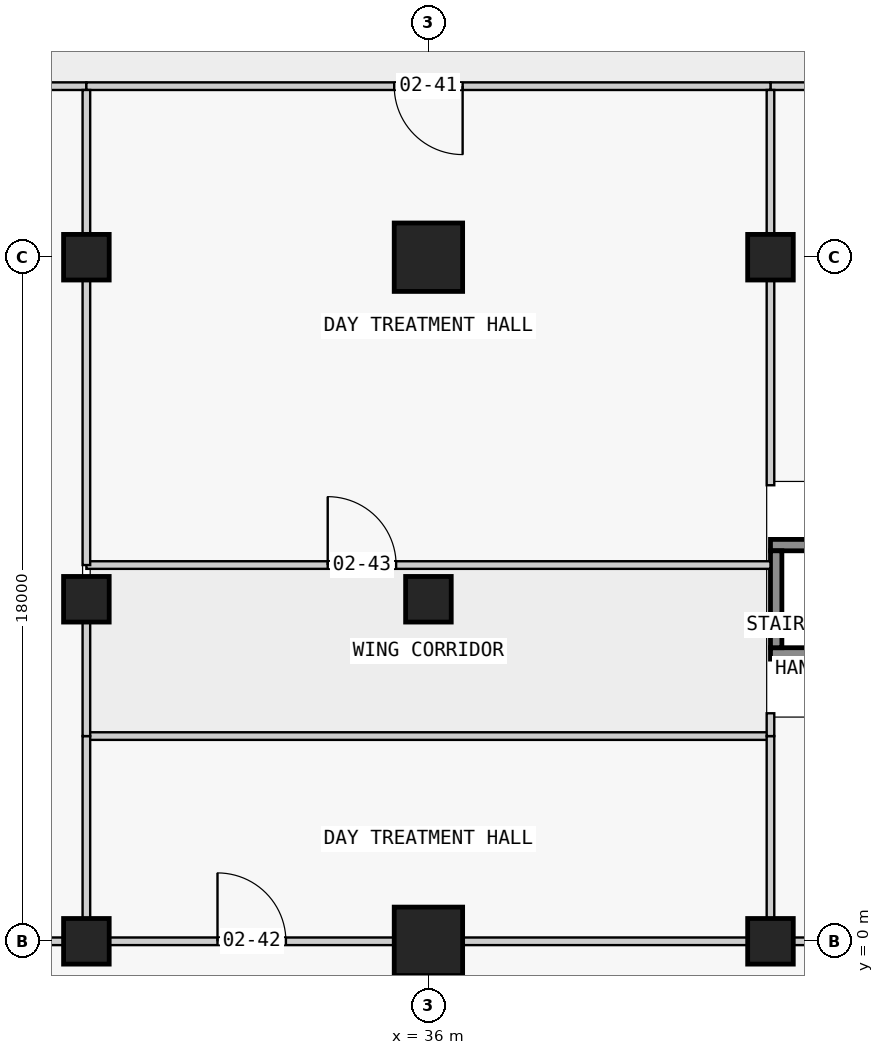
"""IFC4 building model, lengths in metres.
Left out: names, types, materials, properties, quantities, classifications, styles, units other than length and angle.
Written with IfcOpenShell. Run it as: python <this file> out.ifc"""

import sys

from ifc_helpers import new_model, si_unit, direction, frame, frame_2d, origin, origin_2d, place, context, subcontext, project, spatial, rectangle, extrude, element, fill, save


model = new_model("IFC4")
c1 = context("Model", 3, precision=1e-05, world=origin(), true_north=direction((0.0, 1.0)))
c2 = subcontext(c1, "Body", "Model", "MODEL_VIEW")
j1 = project(units=[si_unit("LENGTHUNIT", "METRE"), si_unit("PLANEANGLEUNIT", "RADIAN")], contexts=[c1])
p1 = place(None, origin())
s1 = spatial("IfcSite", under=j1, at=p1, CompositionType="ELEMENT")
p2 = place(p1, origin())
s2 = spatial("IfcBuilding", under=s1, at=p2, CompositionType="ELEMENT")
p3 = place(p2, frame((0.0, 0.0, 12.8)))
s3 = spatial("IfcBuildingStorey", under=s2, at=p3, CompositionType="ELEMENT", Elevation=12.8)
for number, where, z_axis, x_axis in (
    (1, (27.0, 0.0, 0.0), (0.0, 0.0, 1.0), (1.0, 0.0, 0.0)),
    (2, (27.0, 9.0, 0.0), (0.0, 0.0, 1.0), (1.0, 0.0, 0.0)),
    (3, (27.0, 18.0, 0.0), (0.0, 0.0, 1.0), (1.0, 0.0, 0.0)),
):
    element("IfcColumn", number, at=place(p3, frame(where, z_axis=z_axis, x_axis=x_axis)), inside=s3, PredefinedType="COLUMN", context=c2, shape_type="SweptSolid", body=[
        extrude(rectangle(XDim=1.2, YDim=1.2, at=origin_2d()), origin(), (0.0, 0.0, 1.0), 4.5),
    ])
p4 = place(p3, frame((36.0, 0.0, 0.0), z_axis=(0.0, 0.0, 1.0), x_axis=(1.0, 0.0, 0.0)))
e4 = element("IfcColumn", 4, at=p4, inside=s3, PredefinedType="COLUMN", context=c2, shape_type="SweptSolid", body=[
    extrude(rectangle(XDim=1.8, YDim=1.8, at=origin_2d()), origin(), (0.0, 0.0, 1.0), 4.5),
])
p5 = place(p3, frame((36.0, 9.0, 0.0), z_axis=(0.0, 0.0, 1.0), x_axis=(1.0, 0.0, 0.0)))
e5 = element("IfcColumn", 5, at=p5, inside=s3, PredefinedType="COLUMN", context=c2, shape_type="SweptSolid", body=[
    extrude(rectangle(XDim=1.2, YDim=1.2, at=origin_2d()), origin(), (0.0, 0.0, 1.0), 4.5),
])
p6 = place(p3, frame((36.0, 18.0, 0.0), z_axis=(0.0, 0.0, 1.0), x_axis=(1.0, 0.0, 0.0)))
e6 = element("IfcColumn", 6, at=p6, inside=s3, PredefinedType="COLUMN", context=c2, shape_type="SweptSolid", body=[
    extrude(rectangle(XDim=1.8, YDim=1.8, at=origin_2d()), origin(), (0.0, 0.0, 1.0), 4.5),
])
for number, where, z_axis, x_axis in (
    (7, (45.0, 0.0, 0.0), (0.0, 0.0, 1.0), (1.0, 0.0, 0.0)),
    (8, (45.0, 18.0, 0.0), (0.0, 0.0, 1.0), (1.0, 0.0, 0.0)),
):
    element("IfcColumn", number, at=place(p3, frame(where, z_axis=z_axis, x_axis=x_axis)), inside=s3, PredefinedType="COLUMN", context=c2, shape_type="SweptSolid", body=[
        extrude(rectangle(XDim=1.2, YDim=1.2, at=origin_2d()), origin(), (0.0, 0.0, 1.0), 4.5),
    ])
p7 = place(p3, frame((45.15, 7.725, 0.0), z_axis=(0.0, 0.0, 1.0), x_axis=(0.0, 1.0, 0.0)))
e9 = element("IfcWall", 9, at=p7, inside=s3, PredefinedType="SHEAR", context=c2, shape_type="SweptSolid", body=[
    extrude(rectangle(XDim=2.55, YDim=0.3, at=frame_2d((1.275, 0.0))), origin(), (0.0, 0.0, 1.0), 4.5),
])
for number, where, z_axis, x_axis in (
    (10, (45.0, 7.575, 0.0), (0.0, 0.0, 1.0), (1.0, 0.0, 0.0)),
    (11, (45.0, 10.425, 0.0), (0.0, 0.0, 1.0), (1.0, 0.0, 0.0)),
):
    element("IfcWall", number, at=place(p3, frame(where, z_axis=z_axis, x_axis=x_axis)), inside=s3, PredefinedType="SHEAR", context=c2, shape_type="SweptSolid", body=[
        extrude(rectangle(XDim=7.2, YDim=0.3, at=frame_2d((3.6, 0.0))), origin(), (0.0, 0.0, 1.0), 4.5),
    ])
p8 = place(p3, frame((45.6, 0.0, 0.0), z_axis=(0.0, 0.0, 1.0), x_axis=(1.0, 0.0, 0.0)))
e12 = element("IfcWall", 12, at=p8, inside=s3, PredefinedType="PARTITIONING", context=c2, shape_type="SweptSolid", body=[
    extrude(rectangle(XDim=7.5, YDim=0.2, at=frame_2d((3.75, 0.0))), origin(), (0.0, 0.0, 1.0), 3.45),
])
p9 = place(p8, frame((2.85, 0.0, 0.0)))
e13 = element("IfcOpeningElement", 13, at=p9, cuts=e12, PredefinedType="OPENING", context=c2, shape_type="SweptSolid", body=[
    extrude(rectangle(XDim=1.8, YDim=2.1, at=frame_2d((0.9, 1.05))), frame((0.0, 0.11, 0.0), z_axis=(0.0, -1.0, 0.0), x_axis=(1.0, 0.0, 0.0)), (0.0, 0.0, 1.0), 0.22),
])
p10 = place(p3, frame((72.0, 22.5, 0.0), z_axis=(0.0, 0.0, 1.0), x_axis=(-1.0, 0.0, 0.0)))
e14 = element("IfcWall", 14, at=p10, inside=s3, PredefinedType="PARTITIONING", context=c2, shape_type="SweptSolid", body=[
    extrude(rectangle(XDim=27.0, YDim=0.2, at=frame_2d((13.5, 0.0))), origin(), (0.0, 0.0, 1.0), 3.45),
])
p11 = place(p10, frame((12.6, 0.0, 0.0)))
e15 = element("IfcOpeningElement", 15, at=p11, cuts=e14, PredefinedType="OPENING", context=c2, shape_type="SweptSolid", body=[
    extrude(rectangle(XDim=1.8, YDim=2.1, at=frame_2d((0.9, 1.05))), frame((0.0, 0.11, 0.0), z_axis=(0.0, -1.0, 0.0), x_axis=(1.0, 0.0, 0.0)), (0.0, 0.0, 1.0), 0.22),
])
p12 = place(p3, frame((22.5, 22.5, 0.0), z_axis=(0.0, 0.0, 1.0), x_axis=(1.0, 0.0, 0.0)))
e16 = element("IfcWall", 16, at=p12, inside=s3, PredefinedType="PARTITIONING", context=c2, shape_type="SweptSolid", body=[
    extrude(rectangle(XDim=4.5, YDim=0.2, at=frame_2d((2.25, 0.0))), origin(), (0.0, 0.0, 1.0), 3.45),
])
p13 = place(p3, frame((45.0, 22.5, 0.0), z_axis=(0.0, 0.0, 1.0), x_axis=(-1.0, 0.0, 0.0)))
e17 = element("IfcWall", 17, at=p13, inside=s3, PredefinedType="PARTITIONING", context=c2, shape_type="SweptSolid", body=[
    extrude(rectangle(XDim=18.0, YDim=0.2, at=frame_2d((9.0, 0.0))), origin(), (0.0, 0.0, 1.0), 3.45),
])
p14 = place(p13, frame((8.1, 0.0, 0.0)))
e18 = element("IfcOpeningElement", 18, at=p14, cuts=e17, PredefinedType="OPENING", context=c2, shape_type="SweptSolid", body=[
    extrude(rectangle(XDim=1.8, YDim=2.1, at=frame_2d((0.9, 1.05))), frame((0.0, 0.11, 0.0), z_axis=(0.0, -1.0, 0.0), x_axis=(1.0, 0.0, 0.0)), (0.0, 0.0, 1.0), 0.22),
])
p15 = place(p3, frame((27.6, 0.0, 0.0), z_axis=(0.0, 0.0, 1.0), x_axis=(1.0, 0.0, 0.0)))
e19 = element("IfcWall", 19, at=p15, inside=s3, PredefinedType="PARTITIONING", context=c2, shape_type="SweptSolid", body=[
    extrude(rectangle(XDim=7.5, YDim=0.2, at=frame_2d((3.75, 0.0))), origin(), (0.0, 0.0, 1.0), 3.45),
])
p16 = place(p15, frame((2.85, 0.0, 0.0)))
e20 = element("IfcOpeningElement", 20, at=p16, cuts=e19, PredefinedType="OPENING", context=c2, shape_type="SweptSolid", body=[
    extrude(rectangle(XDim=1.8, YDim=2.1, at=frame_2d((0.9, 1.05))), frame((0.0, 0.11, 0.0), z_axis=(0.0, -1.0, 0.0), x_axis=(1.0, 0.0, 0.0)), (0.0, 0.0, 1.0), 0.22),
])
p17 = place(p3, frame((36.9, 0.0, 0.0), z_axis=(0.0, 0.0, 1.0), x_axis=(1.0, 0.0, 0.0)))
e21 = element("IfcWall", 21, at=p17, inside=s3, PredefinedType="PARTITIONING", context=c2, shape_type="SweptSolid", body=[
    extrude(rectangle(XDim=7.5, YDim=0.2, at=frame_2d((3.75, 0.0))), origin(), (0.0, 0.0, 1.0), 3.45),
])
p18 = place(p3, frame((27.0, 9.9, 0.0), z_axis=(0.0, 0.0, 1.0), x_axis=(1.0, 0.0, 0.0)))
e22 = element("IfcWall", 22, at=p18, inside=s3, PredefinedType="PARTITIONING", context=c2, shape_type="SweptSolid", body=[
    extrude(rectangle(XDim=18.0, YDim=0.2, at=frame_2d((9.0, 0.0))), origin(), (0.0, 0.0, 1.0), 3.45),
])
p19 = place(p18, frame((6.35, 0.0, 0.0)))
e23 = element("IfcOpeningElement", 23, at=p19, cuts=e22, PredefinedType="OPENING", context=c2, shape_type="SweptSolid", body=[
    extrude(rectangle(XDim=1.8, YDim=2.1, at=frame_2d((0.9, 1.05))), frame((0.0, 0.11, 0.0), z_axis=(0.0, -1.0, 0.0), x_axis=(1.0, 0.0, 0.0)), (0.0, 0.0, 1.0), 0.22),
])
p20 = place(p3, frame((45.0, 5.4, 0.0), z_axis=(0.0, 0.0, 1.0), x_axis=(-1.0, 0.0, 0.0)))
e24 = element("IfcWall", 24, at=p20, inside=s3, PredefinedType="PARTITIONING", context=c2, shape_type="SweptSolid", body=[
    extrude(rectangle(XDim=18.0, YDim=0.2, at=frame_2d((9.0, 0.0))), origin(), (0.0, 0.0, 1.0), 3.45),
])
p21 = place(p3, frame((27.0, 22.4, 0.0), z_axis=(0.0, 0.0, 1.0), x_axis=(0.0, -1.0, 0.0)))
e25 = element("IfcWall", 25, at=p21, inside=s3, PredefinedType="PARTITIONING", context=c2, shape_type="SweptSolid", body=[
    extrude(rectangle(XDim=3.8, YDim=0.2, at=frame_2d((1.9, 0.0))), origin(), (0.0, 0.0, 1.0), 3.45),
])
p22 = place(p3, frame((27.0, 17.4, 0.0), z_axis=(0.0, 0.0, 1.0), x_axis=(0.0, -1.0, 0.0)))
e26 = element("IfcWall", 26, at=p22, inside=s3, PredefinedType="PARTITIONING", context=c2, shape_type="SweptSolid", body=[
    extrude(rectangle(XDim=7.5, YDim=0.2, at=frame_2d((3.75, 0.0))), origin(), (0.0, 0.0, 1.0), 3.45),
])
p23 = place(p3, frame((45.0, 22.4, 0.0), z_axis=(0.0, 0.0, 1.0), x_axis=(0.0, -1.0, 0.0)))
e27 = element("IfcWall", 27, at=p23, inside=s3, PredefinedType="PARTITIONING", context=c2, shape_type="SweptSolid", body=[
    extrude(rectangle(XDim=3.8, YDim=0.2, at=frame_2d((1.9, 0.0))), origin(), (0.0, 0.0, 1.0), 3.45),
])
p24 = place(p3, frame((45.0, 17.4, 0.0), z_axis=(0.0, 0.0, 1.0), x_axis=(0.0, -1.0, 0.0)))
e28 = element("IfcWall", 28, at=p24, inside=s3, PredefinedType="PARTITIONING", context=c2, shape_type="SweptSolid", body=[
    extrude(rectangle(XDim=5.4, YDim=0.2, at=frame_2d((2.7, 0.0))), origin(), (0.0, 0.0, 1.0), 4.15),
])
p25 = place(p3, frame((27.0, 5.4, 0.0), z_axis=(0.0, 0.0, 1.0), x_axis=(0.0, -1.0, 0.0)))
e29 = element("IfcWall", 29, at=p25, inside=s3, PredefinedType="PARTITIONING", context=c2, shape_type="SweptSolid", body=[
    extrude(rectangle(XDim=4.8, YDim=0.2, at=frame_2d((2.4, 0.0))), origin(), (0.0, 0.0, 1.0), 3.45),
])
p26 = place(p3, frame((45.0, 5.4, 0.0), z_axis=(0.0, 0.0, 1.0), x_axis=(0.0, -1.0, 0.0)))
e30 = element("IfcWall", 30, at=p26, inside=s3, PredefinedType="PARTITIONING", context=c2, shape_type="SweptSolid", body=[
    extrude(rectangle(XDim=4.8, YDim=0.2, at=frame_2d((2.4, 0.0))), origin(), (0.0, 0.0, 1.0), 4.15),
])
p27 = place(p3, frame((27.0, 8.4, 0.0), z_axis=(0.0, 0.0, 1.0), x_axis=(0.0, -1.0, 0.0)))
e31 = element("IfcWall", 31, at=p27, inside=s3, PredefinedType="PARTITIONING", context=c2, shape_type="SweptSolid", body=[
    extrude(rectangle(XDim=3.0, YDim=0.2, at=frame_2d((1.5, 0.0))), origin(), (0.0, 0.0, 1.0), 3.45),
])
p28 = place(p3, frame((26.4, 0.0, 0.0), z_axis=(0.0, 0.0, 1.0), x_axis=(-1.0, 0.0, 0.0)))
e32 = element("IfcWall", 32, at=p28, inside=s3, PredefinedType="PARTITIONING", context=c2, shape_type="SweptSolid", body=[
    extrude(rectangle(XDim=3.9, YDim=0.2, at=frame_2d((1.95, 0.0))), origin(), (0.0, 0.0, 1.0), 4.15),
])
p29 = place(p3, frame((45.0, 6.0, 0.0), z_axis=(0.0, 0.0, 1.0), x_axis=(0.0, -1.0, 0.0)))
e33 = element("IfcWall", 33, at=p29, inside=s3, PredefinedType="PARTITIONING", context=c2, shape_type="SweptSolid", body=[
    extrude(rectangle(XDim=0.6, YDim=0.2, at=frame_2d((0.3, 0.0))), origin(), (0.0, 0.0, 1.0), 4.15),
])
p30 = place(p14, origin())
e34 = element("IfcDoor", 34, at=p30, inside=s3, OperationType="DOUBLE_DOOR_SINGLE_SWING", PredefinedType="DOOR", context=c2, shape_type="SweptSolid", body=[
    extrude(rectangle(XDim=1.8, YDim=2.1, at=frame_2d((0.9, 1.05))), frame((0.0, 0.025, 0.0), z_axis=(0.0, -1.0, 0.0), x_axis=(1.0, 0.0, 0.0)), (0.0, 0.0, 1.0), 0.05),
])
fill(e18, e34)
p31 = place(p16, origin())
e35 = element("IfcDoor", 35, at=p31, inside=s3, OperationType="DOUBLE_DOOR_SINGLE_SWING", PredefinedType="DOOR", context=c2, shape_type="SweptSolid", body=[
    extrude(rectangle(XDim=1.8, YDim=2.1, at=frame_2d((0.9, 1.05))), frame((0.0, 0.025, 0.0), z_axis=(0.0, -1.0, 0.0), x_axis=(1.0, 0.0, 0.0)), (0.0, 0.0, 1.0), 0.05),
])
fill(e20, e35)
p32 = place(p19, origin())
e36 = element("IfcDoor", 36, at=p32, inside=s3, OperationType="DOUBLE_DOOR_SINGLE_SWING", PredefinedType="DOOR", context=c2, shape_type="SweptSolid", body=[
    extrude(rectangle(XDim=1.8, YDim=2.1, at=frame_2d((0.9, 1.05))), frame((0.0, 0.025, 0.0), z_axis=(0.0, -1.0, 0.0), x_axis=(1.0, 0.0, 0.0)), (0.0, 0.0, 1.0), 0.05),
])
fill(e23, e36)
save(model, sys.argv[1])
